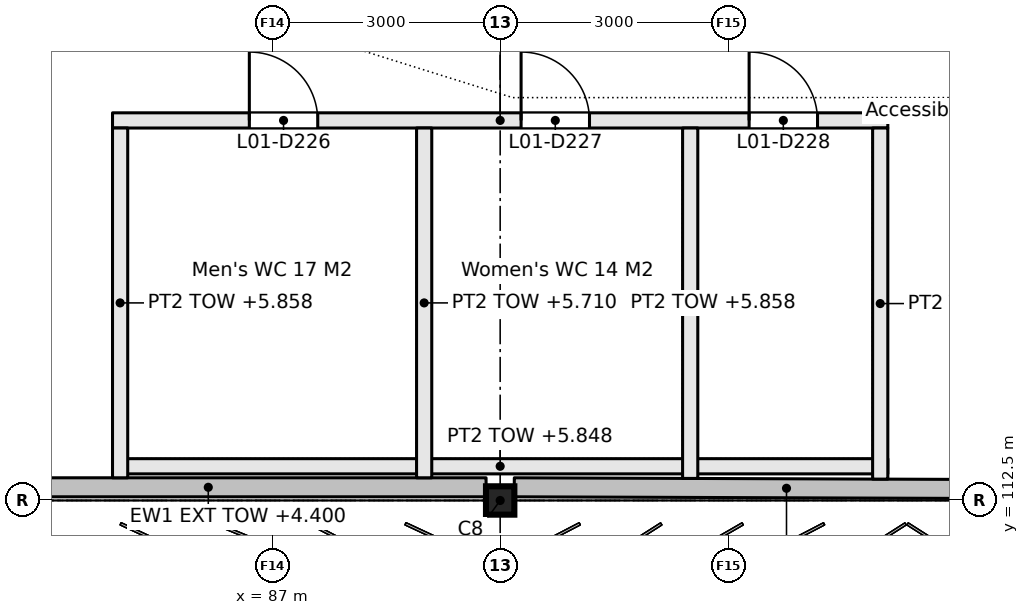
"""IFC4 building model, lengths in metres.
Left out: names, types, materials, properties, quantities, classifications, styles, units other than length and angle.
Written with IfcOpenShell. Run it as: python <this file> out.ifc"""

import sys

from ifc_helpers import new_model, si_unit, direction, frame, frame_2d, origin, origin_2d, place, context, subcontext, project, spatial, rectangle, i_section, extrude, element, fill, save


model = new_model("IFC4")
c1 = context("Model", 3, precision=1e-05, world=origin(), true_north=direction((0.0, 1.0)))
c2 = subcontext(c1, "Body", "Model", "MODEL_VIEW")
j1 = project(units=[si_unit("LENGTHUNIT", "METRE"), si_unit("PLANEANGLEUNIT", "RADIAN")], contexts=[c1])
p1 = place(None, origin())
s1 = spatial("IfcSite", under=j1, at=p1, CompositionType="ELEMENT")
p2 = place(p1, origin())
s2 = spatial("IfcBuilding", under=s1, at=p2, CompositionType="ELEMENT")
p3 = place(p2, frame((0.0, 0.0, 3.3)))
s3 = spatial("IfcBuildingStorey", under=s2, at=p3, CompositionType="ELEMENT", Elevation=3.3)
p4 = place(p3, frame((90.0, 112.5, 0.0), z_axis=(0.0, 0.0, 1.0), x_axis=(1.0, 0.0, 0.0)))
e1 = element("IfcColumn", 1, at=p4, inside=s3, PredefinedType="COLUMN", context=c2, shape_type="SweptSolid", body=[
    extrude(i_section(OverallWidth=0.373, OverallDepth=0.373, WebThickness=0.016, FlangeThickness=0.026, FilletRadius=0.015, at=origin_2d()), origin(), (0.0, 0.0, 1.0), 3.3),
])
p5 = place(p3, frame((84.9, 112.95, 0.0), z_axis=(0.0, 0.0, 1.0), x_axis=(1.0, 0.0, 0.0)))
e2 = element("IfcWall", 2, at=p5, inside=s3, PredefinedType="PARTITIONING", context=c2, shape_type="SweptSolid", body=[
    extrude(rectangle(XDim=10.2, YDim=0.2, at=frame_2d((5.1, 0.0))), origin(), (0.0, 0.0, 1.0), 2.548),
])
p6 = place(p3, frame((84.9, 117.5, 0.0), z_axis=(0.0, 0.0, 1.0), x_axis=(1.0, 0.0, 0.0)))
e3 = element("IfcWall", 3, at=p6, inside=s3, PredefinedType="PARTITIONING", context=c2, shape_type="SweptSolid", body=[
    extrude(rectangle(XDim=10.2, YDim=0.2, at=frame_2d((5.1, 0.0))), origin(), (0.0, 0.0, 1.0), 2.548),
])
p7 = place(p6, frame((1.8, 0.0, 0.0)))
e4 = element("IfcOpeningElement", 4, at=p7, cuts=e3, PredefinedType="OPENING", context=c2, shape_type="SweptSolid", body=[
    extrude(rectangle(XDim=0.9, YDim=2.1, at=frame_2d((0.45, 1.05))), frame((0.0, 0.11, 0.0), z_axis=(0.0, -1.0, 0.0), x_axis=(1.0, 0.0, 0.0)), (0.0, 0.0, 1.0), 0.22),
])
p8 = place(p6, frame((5.375, 0.0, 0.0)))
e5 = element("IfcOpeningElement", 5, at=p8, cuts=e3, PredefinedType="OPENING", context=c2, shape_type="SweptSolid", body=[
    extrude(rectangle(XDim=0.9, YDim=2.1, at=frame_2d((0.45, 1.05))), frame((0.0, 0.11, 0.0), z_axis=(0.0, -1.0, 0.0), x_axis=(1.0, 0.0, 0.0)), (0.0, 0.0, 1.0), 0.22),
])
p9 = place(p6, frame((8.375, 0.0, 0.0)))
e6 = element("IfcOpeningElement", 6, at=p9, cuts=e3, PredefinedType="OPENING", context=c2, shape_type="SweptSolid", body=[
    extrude(rectangle(XDim=0.9, YDim=2.1, at=frame_2d((0.45, 1.05))), frame((0.0, 0.11, 0.0), z_axis=(0.0, -1.0, 0.0), x_axis=(1.0, 0.0, 0.0)), (0.0, 0.0, 1.0), 0.22),
])
p10 = place(p3, frame((85.0, 112.798, 0.0), z_axis=(0.0, 0.0, 1.0), x_axis=(0.0, 1.0, 0.0)))
e7 = element("IfcWall", 7, at=p10, inside=s3, PredefinedType="PARTITIONING", context=c2, shape_type="SweptSolid", body=[
    extrude(rectangle(XDim=4.602, YDim=0.2, at=frame_2d((2.301, 0.0))), origin(), (0.0, 0.0, 1.0), 2.558),
])
p11 = place(p3, frame((89.0, 112.798, 0.0), z_axis=(0.0, 0.0, 1.0), x_axis=(0.0, 1.0, 0.0)))
e8 = element("IfcWall", 8, at=p11, inside=s3, PredefinedType="PARTITIONING", context=c2, shape_type="SweptSolid", body=[
    extrude(rectangle(XDim=4.602, YDim=0.2, at=frame_2d((2.301, 0.0))), origin(), (0.0, 0.0, 1.0), 2.41),
])
p12 = place(p3, frame((92.5, 112.79, 0.0), z_axis=(0.0, 0.0, 1.0), x_axis=(0.0, 1.0, 0.0)))
e9 = element("IfcWall", 9, at=p12, inside=s3, PredefinedType="PARTITIONING", context=c2, shape_type="SweptSolid", body=[
    extrude(rectangle(XDim=4.61, YDim=0.2, at=frame_2d((2.305, 0.0))), origin(), (0.0, 0.0, 1.0), 2.558),
])
p13 = place(p3, frame((95.0, 112.781, 0.0), z_axis=(0.0, 0.0, 1.0), x_axis=(0.0, 1.0, 0.0)))
e10 = element("IfcWall", 10, at=p13, inside=s3, PredefinedType="PARTITIONING", context=c2, shape_type="SweptSolid", body=[
    extrude(rectangle(XDim=4.619, YDim=0.2, at=frame_2d((2.31, 0.0))), origin(), (0.0, 0.0, 1.0), 2.558),
])
p14 = place(p3, frame((82.505, 112.673, 0.0), z_axis=(0.0, 0.0, 1.0), x_axis=(1.0, 0.0, 0.0)))
e11 = element("IfcWall", 11, at=p14, inside=s3, PredefinedType="SOLIDWALL", context=c2, shape_type="SweptSolid", body=[
    extrude(rectangle(XDim=7.31, YDim=0.25, at=frame_2d((3.655, 0.0))), origin(), (0.0, 0.0, 1.0), 1.1),
])
p15 = place(p3, frame((90.186, 112.673, 0.0), z_axis=(0.0, 0.0, 1.0), x_axis=(0.999993473402, -0.003612914829, 0.0)))
e12 = element("IfcWall", 12, at=p15, inside=s3, PredefinedType="SOLIDWALL", context=c2, shape_type="SweptSolid", body=[
    extrude(rectangle(XDim=7.163, YDim=0.25, at=frame_2d((3.582, 0.0))), origin(), (0.0, 0.0, 1.0), 1.1),
])
p16 = place(p7, origin())
e13 = element("IfcDoor", 13, at=p16, inside=s3, OperationType="SINGLE_SWING_LEFT", PredefinedType="DOOR", context=c2, shape_type="SweptSolid", body=[
    extrude(rectangle(XDim=0.9, YDim=2.1, at=frame_2d((0.45, 1.05))), frame((0.0, 0.025, 0.0), z_axis=(0.0, -1.0, 0.0), x_axis=(1.0, 0.0, 0.0)), (0.0, 0.0, 1.0), 0.05),
])
fill(e4, e13)
p17 = place(p8, origin())
e14 = element("IfcDoor", 14, at=p17, inside=s3, OperationType="SINGLE_SWING_RIGHT", PredefinedType="DOOR", context=c2, shape_type="SweptSolid", body=[
    extrude(rectangle(XDim=0.9, YDim=2.1, at=frame_2d((0.45, 1.05))), frame((0.0, 0.025, 0.0), z_axis=(0.0, -1.0, 0.0), x_axis=(1.0, 0.0, 0.0)), (0.0, 0.0, 1.0), 0.05),
])
fill(e5, e14)
p18 = place(p9, origin())
e15 = element("IfcDoor", 15, at=p18, inside=s3, OperationType="SINGLE_SWING_RIGHT", PredefinedType="DOOR", context=c2, shape_type="SweptSolid", body=[
    extrude(rectangle(XDim=0.9, YDim=2.1, at=frame_2d((0.45, 1.05))), frame((0.0, 0.025, 0.0), z_axis=(0.0, -1.0, 0.0), x_axis=(1.0, 0.0, 0.0)), (0.0, 0.0, 1.0), 0.05),
])
fill(e6, e15)
save(model, sys.argv[1])
